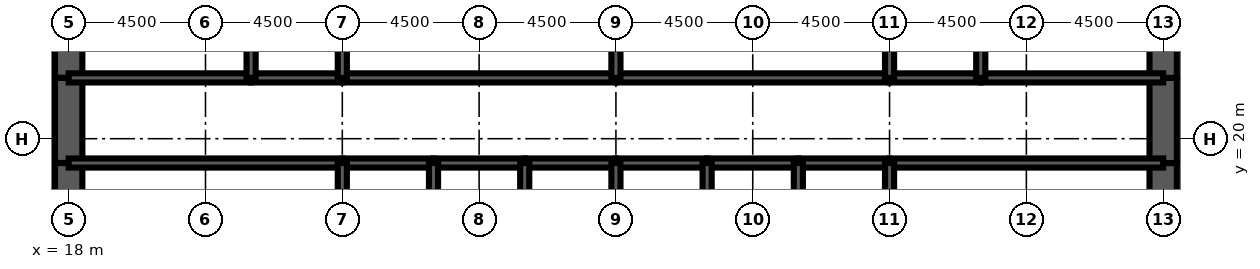
"""IFC4 building model, lengths in metres.
Left out: names, types, materials, properties, quantities, classifications, styles, units other than length and angle.
Written with IfcOpenShell. Run it as: python <this file> out.ifc"""

import sys

from ifc_helpers import new_model, si_unit, direction, frame, frame_2d, origin, place, context, subcontext, project, spatial, rectangle, extrude, element, fill, save


model = new_model("IFC4")
c1 = context("Model", 3, precision=1e-05, world=origin(), true_north=direction((0.0, 1.0)))
c2 = subcontext(c1, "Body", "Model", "MODEL_VIEW")
j1 = project(units=[si_unit("LENGTHUNIT", "METRE"), si_unit("PLANEANGLEUNIT", "RADIAN")], contexts=[c1])
p1 = place(None, origin())
s1 = spatial("IfcSite", under=j1, at=p1, CompositionType="ELEMENT")
p2 = place(p1, origin())
s2 = spatial("IfcBuilding", under=s1, at=p2, CompositionType="ELEMENT")
p3 = place(p2, frame((0.0, 0.0, 100.5)))
s3 = spatial("IfcBuildingStorey", under=s2, at=p3, CompositionType="ELEMENT", Elevation=100.5)
p4 = place(p3, frame((18.0, 26.0, 0.0), z_axis=(0.0, 0.0, 1.0), x_axis=(0.0, -1.0, 0.0)))
e1 = element("IfcWall", 1, at=p4, inside=s3, PredefinedType="SHEAR", context=c2, shape_type="SweptSolid", body=[
    extrude(rectangle(XDim=4.0, YDim=0.9, at=frame_2d((2.0, 0.0))), origin(), (0.0, 0.0, 1.0), 4.2),
])
p5 = place(p3, frame((18.0, 22.0, 0.0), z_axis=(0.0, 0.0, 1.0), x_axis=(0.0, -1.0, 0.0)))
e2 = element("IfcWall", 2, at=p5, inside=s3, PredefinedType="SHEAR", context=c2, shape_type="SweptSolid", body=[
    extrude(rectangle(XDim=2.8, YDim=0.9, at=frame_2d((1.4, 0.0))), origin(), (0.0, 0.0, 1.0), 4.2),
])
p6 = place(p5, frame((0.6, 0.0, 0.0)))
e3 = element("IfcOpeningElement", 3, at=p6, cuts=e2, PredefinedType="OPENING", context=c2, shape_type="SweptSolid", body=[
    extrude(rectangle(XDim=1.8, YDim=2.1, at=frame_2d((0.9, 1.05))), frame((0.0, 0.46, 0.0), z_axis=(0.0, -1.0, 0.0), x_axis=(1.0, 0.0, 0.0)), (0.0, 0.0, 1.0), 0.92),
])
for number, where, z_axis, x_axis in (
    (4, (18.0, 19.2, 0.0), (0.0, 0.0, 1.0), (0.0, -1.0, 0.0)),
    (5, (54.0, 16.0, 0.0), (0.0, 0.0, 1.0), (0.0, 1.0, 0.0)),
):
    element("IfcWall", number, at=place(p3, frame(where, z_axis=z_axis, x_axis=x_axis)), inside=s3, PredefinedType="SHEAR", context=c2, shape_type="SweptSolid", body=[
        extrude(rectangle(XDim=3.2, YDim=0.9, at=frame_2d((1.6, 0.0))), origin(), (0.0, 0.0, 1.0), 4.2),
    ])
p7 = place(p3, frame((54.0, 19.2, 0.0), z_axis=(0.0, 0.0, 1.0), x_axis=(0.0, 1.0, 0.0)))
e6 = element("IfcWall", 6, at=p7, inside=s3, PredefinedType="SHEAR", context=c2, shape_type="SweptSolid", body=[
    extrude(rectangle(XDim=2.8, YDim=0.9, at=frame_2d((1.4, 0.0))), origin(), (0.0, 0.0, 1.0), 4.2),
])
p8 = place(p7, frame((0.4, 0.0, 0.0)))
e7 = element("IfcOpeningElement", 7, at=p8, cuts=e6, PredefinedType="OPENING", context=c2, shape_type="SweptSolid", body=[
    extrude(rectangle(XDim=1.8, YDim=2.1, at=frame_2d((0.9, 1.05))), frame((0.0, 0.46, 0.0), z_axis=(0.0, -1.0, 0.0), x_axis=(1.0, 0.0, 0.0)), (0.0, 0.0, 1.0), 0.92),
])
p9 = place(p3, frame((54.0, 22.0, 0.0), z_axis=(0.0, 0.0, 1.0), x_axis=(0.0, 1.0, 0.0)))
e8 = element("IfcWall", 8, at=p9, inside=s3, PredefinedType="SHEAR", context=c2, shape_type="SweptSolid", body=[
    extrude(rectangle(XDim=4.0, YDim=0.9, at=frame_2d((2.0, 0.0))), origin(), (0.0, 0.0, 1.0), 4.2),
])
p10 = place(p3, frame((18.0, 19.2, 0.0), z_axis=(0.0, 0.0, 1.0), x_axis=(1.0, 0.0, 0.0)))
e9 = element("IfcWall", 9, at=p10, inside=s3, PredefinedType="SOLIDWALL", context=c2, shape_type="SweptSolid", body=[
    extrude(rectangle(XDim=9.0, YDim=0.3, at=frame_2d((4.5, 0.0))), origin(), (0.0, 0.0, 1.0), 4.2),
])
p11 = place(p10, frame((0.65, 0.0, 0.0)))
e10 = element("IfcOpeningElement", 10, at=p11, cuts=e9, PredefinedType="OPENING", context=c2, shape_type="SweptSolid", body=[
    extrude(rectangle(XDim=1.0, YDim=2.1, at=frame_2d((0.5, 1.05))), frame((0.0, 0.16, 0.0), z_axis=(0.0, -1.0, 0.0), x_axis=(1.0, 0.0, 0.0)), (0.0, 0.0, 1.0), 0.32),
])
p12 = place(p3, frame((27.0, 19.2, 0.0), z_axis=(0.0, 0.0, 1.0), x_axis=(1.0, 0.0, 0.0)))
e11 = element("IfcWall", 11, at=p12, inside=s3, PredefinedType="SOLIDWALL", context=c2, shape_type="SweptSolid", body=[
    extrude(rectangle(XDim=3.0, YDim=0.3, at=frame_2d((1.5, 0.0))), origin(), (0.0, 0.0, 1.0), 4.2),
])
p13 = place(p12, frame((0.95, 0.0, 0.0)))
e12 = element("IfcOpeningElement", 12, at=p13, cuts=e11, PredefinedType="OPENING", context=c2, shape_type="SweptSolid", body=[
    extrude(rectangle(XDim=1.1, YDim=2.2, at=frame_2d((0.55, 1.1))), frame((0.0, 0.16, 0.0), z_axis=(0.0, -1.0, 0.0), x_axis=(1.0, 0.0, 0.0)), (0.0, 0.0, 1.0), 0.32),
])
p14 = place(p3, frame((30.0, 19.2, 0.0), z_axis=(0.0, 0.0, 1.0), x_axis=(1.0, 0.0, 0.0)))
e13 = element("IfcWall", 13, at=p14, inside=s3, PredefinedType="SOLIDWALL", context=c2, shape_type="SweptSolid", body=[
    extrude(rectangle(XDim=3.0, YDim=0.3, at=frame_2d((1.5, 0.0))), origin(), (0.0, 0.0, 1.0), 4.2),
])
p15 = place(p14, frame((0.95, 0.0, 0.0)))
e14 = element("IfcOpeningElement", 14, at=p15, cuts=e13, PredefinedType="OPENING", context=c2, shape_type="SweptSolid", body=[
    extrude(rectangle(XDim=1.1, YDim=2.2, at=frame_2d((0.55, 1.1))), frame((0.0, 0.16, 0.0), z_axis=(0.0, -1.0, 0.0), x_axis=(1.0, 0.0, 0.0)), (0.0, 0.0, 1.0), 0.32),
])
p16 = place(p3, frame((33.0, 19.2, 0.0), z_axis=(0.0, 0.0, 1.0), x_axis=(1.0, 0.0, 0.0)))
e15 = element("IfcWall", 15, at=p16, inside=s3, PredefinedType="SOLIDWALL", context=c2, shape_type="SweptSolid", body=[
    extrude(rectangle(XDim=3.0, YDim=0.3, at=frame_2d((1.5, 0.0))), origin(), (0.0, 0.0, 1.0), 4.2),
])
p17 = place(p16, frame((0.95, 0.0, 0.0)))
e16 = element("IfcOpeningElement", 16, at=p17, cuts=e15, PredefinedType="OPENING", context=c2, shape_type="SweptSolid", body=[
    extrude(rectangle(XDim=1.1, YDim=2.2, at=frame_2d((0.55, 1.1))), frame((0.0, 0.16, 0.0), z_axis=(0.0, -1.0, 0.0), x_axis=(1.0, 0.0, 0.0)), (0.0, 0.0, 1.0), 0.32),
])
p18 = place(p3, frame((36.0, 19.2, 0.0), z_axis=(0.0, 0.0, 1.0), x_axis=(1.0, 0.0, 0.0)))
e17 = element("IfcWall", 17, at=p18, inside=s3, PredefinedType="SOLIDWALL", context=c2, shape_type="SweptSolid", body=[
    extrude(rectangle(XDim=3.0, YDim=0.3, at=frame_2d((1.5, 0.0))), origin(), (0.0, 0.0, 1.0), 4.2),
])
p19 = place(p18, frame((0.95, 0.0, 0.0)))
e18 = element("IfcOpeningElement", 18, at=p19, cuts=e17, PredefinedType="OPENING", context=c2, shape_type="SweptSolid", body=[
    extrude(rectangle(XDim=1.1, YDim=2.2, at=frame_2d((0.55, 1.1))), frame((0.0, 0.16, 0.0), z_axis=(0.0, -1.0, 0.0), x_axis=(1.0, 0.0, 0.0)), (0.0, 0.0, 1.0), 0.32),
])
p20 = place(p3, frame((39.0, 19.2, 0.0), z_axis=(0.0, 0.0, 1.0), x_axis=(1.0, 0.0, 0.0)))
e19 = element("IfcWall", 19, at=p20, inside=s3, PredefinedType="SOLIDWALL", context=c2, shape_type="SweptSolid", body=[
    extrude(rectangle(XDim=3.0, YDim=0.3, at=frame_2d((1.5, 0.0))), origin(), (0.0, 0.0, 1.0), 4.2),
])
p21 = place(p20, frame((0.95, 0.0, 0.0)))
e20 = element("IfcOpeningElement", 20, at=p21, cuts=e19, PredefinedType="OPENING", context=c2, shape_type="SweptSolid", body=[
    extrude(rectangle(XDim=1.1, YDim=2.2, at=frame_2d((0.55, 1.1))), frame((0.0, 0.16, 0.0), z_axis=(0.0, -1.0, 0.0), x_axis=(1.0, 0.0, 0.0)), (0.0, 0.0, 1.0), 0.32),
])
p22 = place(p3, frame((42.0, 19.2, 0.0), z_axis=(0.0, 0.0, 1.0), x_axis=(1.0, 0.0, 0.0)))
e21 = element("IfcWall", 21, at=p22, inside=s3, PredefinedType="SOLIDWALL", context=c2, shape_type="SweptSolid", body=[
    extrude(rectangle(XDim=3.0, YDim=0.3, at=frame_2d((1.5, 0.0))), origin(), (0.0, 0.0, 1.0), 4.2),
])
p23 = place(p3, frame((45.0, 19.2, 0.0), z_axis=(0.0, 0.0, 1.0), x_axis=(1.0, 0.0, 0.0)))
e22 = element("IfcWall", 22, at=p23, inside=s3, PredefinedType="SOLIDWALL", context=c2, shape_type="SweptSolid", body=[
    extrude(rectangle(XDim=9.0, YDim=0.3, at=frame_2d((4.5, 0.0))), origin(), (0.0, 0.0, 1.0), 4.2),
])
p24 = place(p23, frame((7.35, 0.0, 0.0)))
e23 = element("IfcOpeningElement", 23, at=p24, cuts=e22, PredefinedType="OPENING", context=c2, shape_type="SweptSolid", body=[
    extrude(rectangle(XDim=1.0, YDim=2.1, at=frame_2d((0.5, 1.05))), frame((0.0, 0.16, 0.0), z_axis=(0.0, -1.0, 0.0), x_axis=(1.0, 0.0, 0.0)), (0.0, 0.0, 1.0), 0.32),
])
p25 = place(p3, frame((18.0, 22.0, 0.0), z_axis=(0.0, 0.0, 1.0), x_axis=(1.0, 0.0, 0.0)))
e24 = element("IfcWall", 24, at=p25, inside=s3, PredefinedType="SOLIDWALL", context=c2, shape_type="SweptSolid", body=[
    extrude(rectangle(XDim=6.0, YDim=0.3, at=frame_2d((3.0, 0.0))), origin(), (0.0, 0.0, 1.0), 4.2),
])
p26 = place(p25, frame((2.0, 0.0, 0.0)))
e25 = element("IfcOpeningElement", 25, at=p26, cuts=e24, PredefinedType="OPENING", context=c2, shape_type="SweptSolid", body=[
    extrude(rectangle(XDim=1.0, YDim=2.1, at=frame_2d((0.5, 1.05))), frame((0.0, 0.16, 0.0), z_axis=(0.0, -1.0, 0.0), x_axis=(1.0, 0.0, 0.0)), (0.0, 0.0, 1.0), 0.32),
])
p27 = place(p3, frame((24.0, 22.0, 0.0), z_axis=(0.0, 0.0, 1.0), x_axis=(1.0, 0.0, 0.0)))
e26 = element("IfcWall", 26, at=p27, inside=s3, PredefinedType="SOLIDWALL", context=c2, shape_type="SweptSolid", body=[
    extrude(rectangle(XDim=3.0, YDim=0.3, at=frame_2d((1.5, 0.0))), origin(), (0.0, 0.0, 1.0), 4.2),
])
p28 = place(p27, frame((1.0, 0.0, 0.0)))
e27 = element("IfcOpeningElement", 27, at=p28, cuts=e26, PredefinedType="OPENING", context=c2, shape_type="SweptSolid", body=[
    extrude(rectangle(XDim=1.0, YDim=2.1, at=frame_2d((0.5, 1.05))), frame((0.0, 0.16, 0.0), z_axis=(0.0, -1.0, 0.0), x_axis=(1.0, 0.0, 0.0)), (0.0, 0.0, 1.0), 0.32),
])
p29 = place(p3, frame((27.0, 22.0, 0.0), z_axis=(0.0, 0.0, 1.0), x_axis=(1.0, 0.0, 0.0)))
e28 = element("IfcWall", 28, at=p29, inside=s3, PredefinedType="SOLIDWALL", context=c2, shape_type="SweptSolid", body=[
    extrude(rectangle(XDim=9.0, YDim=0.3, at=frame_2d((4.5, 0.0))), origin(), (0.0, 0.0, 1.0), 4.2),
])
p30 = place(p29, frame((4.0, 0.0, 0.0)))
e29 = element("IfcOpeningElement", 29, at=p30, cuts=e28, PredefinedType="OPENING", context=c2, shape_type="SweptSolid", body=[
    extrude(rectangle(XDim=1.0, YDim=2.1, at=frame_2d((0.5, 1.05))), frame((0.0, 0.16, 0.0), z_axis=(0.0, -1.0, 0.0), x_axis=(1.0, 0.0, 0.0)), (0.0, 0.0, 1.0), 0.32),
])
p31 = place(p3, frame((36.0, 22.0, 0.0), z_axis=(0.0, 0.0, 1.0), x_axis=(1.0, 0.0, 0.0)))
e30 = element("IfcWall", 30, at=p31, inside=s3, PredefinedType="SOLIDWALL", context=c2, shape_type="SweptSolid", body=[
    extrude(rectangle(XDim=9.0, YDim=0.3, at=frame_2d((4.5, 0.0))), origin(), (0.0, 0.0, 1.0), 4.2),
])
p32 = place(p31, frame((4.0, 0.0, 0.0)))
e31 = element("IfcOpeningElement", 31, at=p32, cuts=e30, PredefinedType="OPENING", context=c2, shape_type="SweptSolid", body=[
    extrude(rectangle(XDim=1.0, YDim=2.1, at=frame_2d((0.5, 1.05))), frame((0.0, 0.16, 0.0), z_axis=(0.0, -1.0, 0.0), x_axis=(1.0, 0.0, 0.0)), (0.0, 0.0, 1.0), 0.32),
])
p33 = place(p3, frame((45.0, 22.0, 0.0), z_axis=(0.0, 0.0, 1.0), x_axis=(1.0, 0.0, 0.0)))
e32 = element("IfcWall", 32, at=p33, inside=s3, PredefinedType="SOLIDWALL", context=c2, shape_type="SweptSolid", body=[
    extrude(rectangle(XDim=3.0, YDim=0.3, at=frame_2d((1.5, 0.0))), origin(), (0.0, 0.0, 1.0), 4.2),
])
p34 = place(p33, frame((1.0, 0.0, 0.0)))
e33 = element("IfcOpeningElement", 33, at=p34, cuts=e32, PredefinedType="OPENING", context=c2, shape_type="SweptSolid", body=[
    extrude(rectangle(XDim=1.0, YDim=2.1, at=frame_2d((0.5, 1.05))), frame((0.0, 0.16, 0.0), z_axis=(0.0, -1.0, 0.0), x_axis=(1.0, 0.0, 0.0)), (0.0, 0.0, 1.0), 0.32),
])
p35 = place(p3, frame((48.0, 22.0, 0.0), z_axis=(0.0, 0.0, 1.0), x_axis=(1.0, 0.0, 0.0)))
e34 = element("IfcWall", 34, at=p35, inside=s3, PredefinedType="SOLIDWALL", context=c2, shape_type="SweptSolid", body=[
    extrude(rectangle(XDim=6.0, YDim=0.3, at=frame_2d((3.0, 0.0))), origin(), (0.0, 0.0, 1.0), 4.2),
])
p36 = place(p35, frame((2.0, 0.0, 0.0)))
e35 = element("IfcOpeningElement", 35, at=p36, cuts=e34, PredefinedType="OPENING", context=c2, shape_type="SweptSolid", body=[
    extrude(rectangle(XDim=1.0, YDim=2.1, at=frame_2d((0.5, 1.05))), frame((0.0, 0.16, 0.0), z_axis=(0.0, -1.0, 0.0), x_axis=(1.0, 0.0, 0.0)), (0.0, 0.0, 1.0), 0.32),
])
p37 = place(p35, frame((4.3, 0.0, 0.0)))
e36 = element("IfcOpeningElement", 36, at=p37, cuts=e34, PredefinedType="OPENING", context=c2, shape_type="SweptSolid", body=[
    extrude(rectangle(XDim=1.0, YDim=2.1, at=frame_2d((0.5, 1.05))), frame((0.0, 0.16, 0.0), z_axis=(0.0, -1.0, 0.0), x_axis=(1.0, 0.0, 0.0)), (0.0, 0.0, 1.0), 0.32),
])
for number, where, z_axis, x_axis in (
    (37, (27.0, 16.0, 0.0), (0.0, 0.0, 1.0), (0.0, 1.0, 0.0)),
    (38, (30.0, 16.0, 0.0), (0.0, 0.0, 1.0), (0.0, 1.0, 0.0)),
    (39, (33.0, 16.0, 0.0), (0.0, 0.0, 1.0), (0.0, 1.0, 0.0)),
    (40, (36.0, 16.0, 0.0), (0.0, 0.0, 1.0), (0.0, 1.0, 0.0)),
    (41, (39.0, 16.0, 0.0), (0.0, 0.0, 1.0), (0.0, 1.0, 0.0)),
    (42, (42.0, 16.0, 0.0), (0.0, 0.0, 1.0), (0.0, 1.0, 0.0)),
    (43, (45.0, 16.0, 0.0), (0.0, 0.0, 1.0), (0.0, 1.0, 0.0)),
):
    element("IfcWall", number, at=place(p3, frame(where, z_axis=z_axis, x_axis=x_axis)), inside=s3, PredefinedType="SOLIDWALL", context=c2, shape_type="SweptSolid", body=[
        extrude(rectangle(XDim=3.2, YDim=0.3, at=frame_2d((1.6, 0.0))), origin(), (0.0, 0.0, 1.0), 4.2),
    ])
for number, where, z_axis, x_axis in (
    (44, (24.0, 22.0, 0.0), (0.0, 0.0, 1.0), (0.0, 1.0, 0.0)),
    (45, (27.0, 22.0, 0.0), (0.0, 0.0, 1.0), (0.0, 1.0, 0.0)),
    (46, (36.0, 22.0, 0.0), (0.0, 0.0, 1.0), (0.0, 1.0, 0.0)),
    (47, (45.0, 22.0, 0.0), (0.0, 0.0, 1.0), (0.0, 1.0, 0.0)),
    (48, (48.0, 22.0, 0.0), (0.0, 0.0, 1.0), (0.0, 1.0, 0.0)),
):
    element("IfcWall", number, at=place(p3, frame(where, z_axis=z_axis, x_axis=x_axis)), inside=s3, PredefinedType="SOLIDWALL", context=c2, shape_type="SweptSolid", body=[
        extrude(rectangle(XDim=4.0, YDim=0.3, at=frame_2d((2.0, 0.0))), origin(), (0.0, 0.0, 1.0), 4.2),
    ])
p38 = place(p3, frame((42.5, 22.15, 0.0), z_axis=(0.0, 0.0, 1.0), x_axis=(0.0, 1.0, 0.0)))
e49 = element("IfcWall", 49, at=p38, inside=s3, PredefinedType="PARTITIONING", context=c2, shape_type="SweptSolid", body=[
    extrude(rectangle(XDim=3.7, YDim=0.15, at=frame_2d((1.85, 0.0))), origin(), (0.0, 0.0, 1.0), 3.0),
])
p39 = place(p38, frame((2.2, 0.0, 0.0)))
e50 = element("IfcOpeningElement", 50, at=p39, cuts=e49, PredefinedType="OPENING", context=c2, shape_type="SweptSolid", body=[
    extrude(rectangle(XDim=1.0, YDim=2.1, at=frame_2d((0.5, 1.05))), frame((0.0, 0.085, 0.0), z_axis=(0.0, -1.0, 0.0), x_axis=(1.0, 0.0, 0.0)), (0.0, 0.0, 1.0), 0.17),
])
p40 = place(p3, frame((51.975, 22.15, 0.0), z_axis=(0.0, 0.0, 1.0), x_axis=(0.0, 1.0, 0.0)))
e51 = element("IfcWall", 51, at=p40, inside=s3, PredefinedType="PARTITIONING", context=c2, shape_type="SweptSolid", body=[
    extrude(rectangle(XDim=3.7, YDim=0.15, at=frame_2d((1.85, 0.0))), origin(), (0.0, 0.0, 1.0), 3.0),
])
p41 = place(p13, origin())
e52 = element("IfcDoor", 52, at=p41, inside=s3, OperationType="DOUBLE_DOOR_SLIDING", PredefinedType="USERDEFINED", context=c2, shape_type="SweptSolid", body=[
    extrude(rectangle(XDim=1.1, YDim=2.2, at=frame_2d((0.55, 1.1))), frame((0.0, 0.025, 0.0), z_axis=(0.0, -1.0, 0.0), x_axis=(1.0, 0.0, 0.0)), (0.0, 0.0, 1.0), 0.05),
])
fill(e12, e52)
p42 = place(p21, origin())
e53 = element("IfcDoor", 53, at=p42, inside=s3, OperationType="DOUBLE_DOOR_SLIDING", PredefinedType="USERDEFINED", context=c2, shape_type="SweptSolid", body=[
    extrude(rectangle(XDim=1.1, YDim=2.2, at=frame_2d((0.55, 1.1))), frame((0.0, 0.025, 0.0), z_axis=(0.0, -1.0, 0.0), x_axis=(1.0, 0.0, 0.0)), (0.0, 0.0, 1.0), 0.05),
])
fill(e20, e53)
p43 = place(p15, origin())
e54 = element("IfcDoor", 54, at=p43, inside=s3, OperationType="DOUBLE_DOOR_SLIDING", PredefinedType="USERDEFINED", context=c2, shape_type="SweptSolid", body=[
    extrude(rectangle(XDim=1.1, YDim=2.2, at=frame_2d((0.55, 1.1))), frame((0.0, 0.025, 0.0), z_axis=(0.0, -1.0, 0.0), x_axis=(1.0, 0.0, 0.0)), (0.0, 0.0, 1.0), 0.05),
])
fill(e14, e54)
p44 = place(p17, origin())
e55 = element("IfcDoor", 55, at=p44, inside=s3, OperationType="DOUBLE_DOOR_SLIDING", PredefinedType="USERDEFINED", context=c2, shape_type="SweptSolid", body=[
    extrude(rectangle(XDim=1.1, YDim=2.2, at=frame_2d((0.55, 1.1))), frame((0.0, 0.025, 0.0), z_axis=(0.0, -1.0, 0.0), x_axis=(1.0, 0.0, 0.0)), (0.0, 0.0, 1.0), 0.05),
])
fill(e16, e55)
p45 = place(p19, origin())
e56 = element("IfcDoor", 56, at=p45, inside=s3, OperationType="DOUBLE_DOOR_SLIDING", PredefinedType="USERDEFINED", context=c2, shape_type="SweptSolid", body=[
    extrude(rectangle(XDim=1.1, YDim=2.2, at=frame_2d((0.55, 1.1))), frame((0.0, 0.025, 0.0), z_axis=(0.0, -1.0, 0.0), x_axis=(1.0, 0.0, 0.0)), (0.0, 0.0, 1.0), 0.05),
])
fill(e18, e56)
p46 = place(p11, origin())
e57 = element("IfcDoor", 57, at=p46, inside=s3, OperationType="SINGLE_SWING_LEFT", PredefinedType="DOOR", context=c2, shape_type="SweptSolid", body=[
    extrude(rectangle(XDim=1.0, YDim=2.1, at=frame_2d((0.5, 1.05))), frame((0.0, 0.025, 0.0), z_axis=(0.0, -1.0, 0.0), x_axis=(1.0, 0.0, 0.0)), (0.0, 0.0, 1.0), 0.05),
])
fill(e10, e57)
p47 = place(p24, origin())
e58 = element("IfcDoor", 58, at=p47, inside=s3, OperationType="SINGLE_SWING_RIGHT", PredefinedType="DOOR", context=c2, shape_type="SweptSolid", body=[
    extrude(rectangle(XDim=1.0, YDim=2.1, at=frame_2d((0.5, 1.05))), frame((0.0, 0.025, 0.0), z_axis=(0.0, -1.0, 0.0), x_axis=(1.0, 0.0, 0.0)), (0.0, 0.0, 1.0), 0.05),
])
fill(e23, e58)
p48 = place(p6, origin())
e59 = element("IfcDoor", 59, at=p48, inside=s3, OperationType="SINGLE_SWING_LEFT", PredefinedType="DOOR", context=c2, shape_type="SweptSolid", body=[
    extrude(rectangle(XDim=1.8, YDim=2.1, at=frame_2d((0.9, 1.05))), frame((0.0, 0.45, 0.0), z_axis=(0.0, -1.0, 0.0), x_axis=(1.0, 0.0, 0.0)), (0.0, 0.0, 1.0), 0.899),
])
fill(e3, e59)
p49 = place(p8, origin())
e60 = element("IfcDoor", 60, at=p49, inside=s3, OperationType="SINGLE_SWING_LEFT", PredefinedType="DOOR", context=c2, shape_type="SweptSolid", body=[
    extrude(rectangle(XDim=1.8, YDim=2.1, at=frame_2d((0.9, 1.05))), frame((0.0, 0.45, 0.0), z_axis=(0.0, -1.0, 0.0), x_axis=(1.0, 0.0, 0.0)), (0.0, 0.0, 1.0), 0.899),
])
fill(e7, e60)
p50 = place(p26, origin())
e61 = element("IfcDoor", 61, at=p50, inside=s3, OperationType="SINGLE_SWING_LEFT", PredefinedType="DOOR", context=c2, shape_type="SweptSolid", body=[
    extrude(rectangle(XDim=1.0, YDim=2.1, at=frame_2d((0.5, 1.05))), frame((0.0, 0.025, 0.0), z_axis=(0.0, -1.0, 0.0), x_axis=(1.0, 0.0, 0.0)), (0.0, 0.0, 1.0), 0.05),
])
fill(e25, e61)
p51 = place(p28, origin())
e62 = element("IfcDoor", 62, at=p51, inside=s3, OperationType="SINGLE_SWING_LEFT", PredefinedType="DOOR", context=c2, shape_type="SweptSolid", body=[
    extrude(rectangle(XDim=1.0, YDim=2.1, at=frame_2d((0.5, 1.05))), frame((0.0, 0.025, 0.0), z_axis=(0.0, -1.0, 0.0), x_axis=(1.0, 0.0, 0.0)), (0.0, 0.0, 1.0), 0.05),
])
fill(e27, e62)
p52 = place(p30, origin())
e63 = element("IfcDoor", 63, at=p52, inside=s3, OperationType="SINGLE_SWING_LEFT", PredefinedType="DOOR", context=c2, shape_type="SweptSolid", body=[
    extrude(rectangle(XDim=1.0, YDim=2.1, at=frame_2d((0.5, 1.05))), frame((0.0, 0.025, 0.0), z_axis=(0.0, -1.0, 0.0), x_axis=(1.0, 0.0, 0.0)), (0.0, 0.0, 1.0), 0.05),
])
fill(e29, e63)
p53 = place(p32, origin())
e64 = element("IfcDoor", 64, at=p53, inside=s3, OperationType="SINGLE_SWING_LEFT", PredefinedType="DOOR", context=c2, shape_type="SweptSolid", body=[
    extrude(rectangle(XDim=1.0, YDim=2.1, at=frame_2d((0.5, 1.05))), frame((0.0, 0.025, 0.0), z_axis=(0.0, -1.0, 0.0), x_axis=(1.0, 0.0, 0.0)), (0.0, 0.0, 1.0), 0.05),
])
fill(e31, e64)
p54 = place(p34, origin())
e65 = element("IfcDoor", 65, at=p54, inside=s3, OperationType="SINGLE_SWING_LEFT", PredefinedType="DOOR", context=c2, shape_type="SweptSolid", body=[
    extrude(rectangle(XDim=1.0, YDim=2.1, at=frame_2d((0.5, 1.05))), frame((0.0, 0.025, 0.0), z_axis=(0.0, -1.0, 0.0), x_axis=(1.0, 0.0, 0.0)), (0.0, 0.0, 1.0), 0.05),
])
fill(e33, e65)
p55 = place(p36, origin())
e66 = element("IfcDoor", 66, at=p55, inside=s3, OperationType="SINGLE_SWING_LEFT", PredefinedType="DOOR", context=c2, shape_type="SweptSolid", body=[
    extrude(rectangle(XDim=1.0, YDim=2.1, at=frame_2d((0.5, 1.05))), frame((0.0, 0.025, 0.0), z_axis=(0.0, -1.0, 0.0), x_axis=(1.0, 0.0, 0.0)), (0.0, 0.0, 1.0), 0.05),
])
fill(e35, e66)
p56 = place(p37, origin())
e67 = element("IfcDoor", 67, at=p56, inside=s3, OperationType="SINGLE_SWING_RIGHT", PredefinedType="DOOR", context=c2, shape_type="SweptSolid", body=[
    extrude(rectangle(XDim=1.0, YDim=2.1, at=frame_2d((0.5, 1.05))), frame((0.0, 0.025, 0.0), z_axis=(0.0, -1.0, 0.0), x_axis=(1.0, 0.0, 0.0)), (0.0, 0.0, 1.0), 0.05),
])
fill(e36, e67)
save(model, sys.argv[1])
